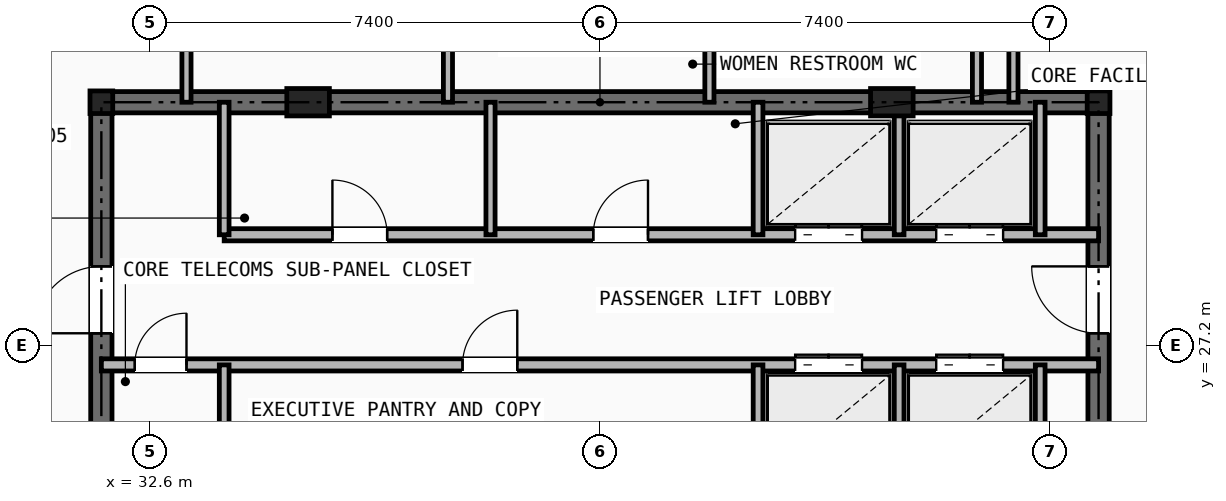
"""IFC4 building model, lengths in metres.
Left out: names, types, materials, properties, quantities, classifications, styles, units other than length and angle.
Written with IfcOpenShell. Run it as: python <this file> out.ifc"""

import sys

from ifc_helpers import new_model, si_unit, direction, frame, frame_2d, origin, origin_2d, place, context, subcontext, project, spatial, rectangle, i_section, extrude, element, fill, save


model = new_model("IFC4")
c1 = context("Model", 3, precision=1e-05, world=origin(), true_north=direction((0.0, 1.0)))
c2 = subcontext(c1, "Body", "Model", "MODEL_VIEW")
j1 = project(units=[si_unit("LENGTHUNIT", "METRE"), si_unit("PLANEANGLEUNIT", "RADIAN")], contexts=[c1])
p1 = place(None, origin())
s1 = spatial("IfcSite", under=j1, at=p1, CompositionType="ELEMENT")
p2 = place(p1, origin())
s2 = spatial("IfcBuilding", under=s1, at=p2, CompositionType="ELEMENT")
p3 = place(p2, frame((0.0, 0.0, 243.4)))
s3 = spatial("IfcBuildingStorey", under=s2, at=p3, CompositionType="ELEMENT", Elevation=243.4)
for number, where, z_axis, x_axis in (
    (1, (31.8, 31.2, 0.0), (0.0, 0.0, 1.0), (1.0, 0.0, 0.0)),
    (2, (48.2, 31.2, 0.0), (0.0, 0.0, 1.0), (1.0, 0.0, 0.0)),
):
    element("IfcColumn", number, at=place(p3, frame(where, z_axis=z_axis, x_axis=x_axis)), inside=s3, PredefinedType="COLUMN", context=c2, shape_type="SweptSolid", body=[
        extrude(i_section(OverallWidth=0.374, OverallDepth=0.372, WebThickness=0.016, FlangeThickness=0.026, at=origin_2d()), origin(), (0.0, 0.0, 1.0), 3.5),
    ])
for number, where, z_axis, x_axis in (
    (3, (35.2, 31.2, 0.0), (0.0, 0.0, 1.0), (1.0, 0.0, 0.0)),
    (4, (44.8, 31.2, 0.0), (0.0, 0.0, 1.0), (1.0, 0.0, 0.0)),
):
    element("IfcColumn", number, at=place(p3, frame(where, z_axis=z_axis, x_axis=x_axis)), inside=s3, PredefinedType="PILASTER", context=c2, shape_type="SweptSolid", body=[
        extrude(rectangle(XDim=0.7, YDim=0.45, at=origin_2d()), origin(), (0.0, 0.0, 1.0), 3.5),
    ])
p4 = place(p3, frame((31.8, 31.2, 0.0), z_axis=(0.0, 0.0, 1.0), x_axis=(1.0, 0.0, 0.0)))
e5 = element("IfcWall", 5, at=p4, inside=s3, PredefinedType="SHEAR", context=c2, shape_type="SweptSolid", body=[
    extrude(rectangle(XDim=16.4, YDim=0.35, at=frame_2d((8.2, 0.0))), origin(), (0.0, 0.0, 1.0), 3.25),
])
p5 = place(p3, frame((31.8, 16.4, 0.0), z_axis=(0.0, 0.0, 1.0), x_axis=(0.0, 1.0, 0.0)))
e6 = element("IfcWall", 6, at=p5, inside=s3, PredefinedType="SHEAR", context=c2, shape_type="SweptSolid", body=[
    extrude(rectangle(XDim=14.8, YDim=0.35, at=frame_2d((7.4, 0.0))), origin(), (0.0, 0.0, 1.0), 3.25),
])
p6 = place(p5, frame((11.0, 0.0, 0.0)))
e7 = element("IfcOpeningElement", 7, at=p6, cuts=e6, PredefinedType="OPENING", context=c2, shape_type="SweptSolid", body=[
    extrude(rectangle(XDim=1.1, YDim=2.15, at=frame_2d((0.55, 1.075))), frame((0.0, 0.185, 0.0), z_axis=(0.0, -1.0, 0.0), x_axis=(1.0, 0.0, 0.0)), (0.0, 0.0, 1.0), 0.37),
])
p7 = place(p3, frame((48.2, 16.4, 0.0), z_axis=(0.0, 0.0, 1.0), x_axis=(0.0, 1.0, 0.0)))
e8 = element("IfcWall", 8, at=p7, inside=s3, PredefinedType="SHEAR", context=c2, shape_type="SweptSolid", body=[
    extrude(rectangle(XDim=14.8, YDim=0.35, at=frame_2d((7.4, 0.0))), origin(), (0.0, 0.0, 1.0), 3.25),
])
p8 = place(p7, frame((11.0, 0.0, 0.0)))
e9 = element("IfcOpeningElement", 9, at=p8, cuts=e8, PredefinedType="OPENING", context=c2, shape_type="SweptSolid", body=[
    extrude(rectangle(XDim=1.1, YDim=2.15, at=frame_2d((0.55, 1.075))), frame((0.0, 0.185, 0.0), z_axis=(0.0, -1.0, 0.0), x_axis=(1.0, 0.0, 0.0)), (0.0, 0.0, 1.0), 0.37),
])
p9 = place(p3, frame((33.82, 29.02, 0.0), z_axis=(0.0, 0.0, 1.0), x_axis=(1.0, 0.0, 0.0)))
e10 = element("IfcWall", 10, at=p9, inside=s3, PredefinedType="SOLIDWALL", context=c2, shape_type="SweptSolid", body=[
    extrude(rectangle(XDim=14.38, YDim=0.2, at=frame_2d((7.19, 0.0))), origin(), (0.0, 0.0, 1.0), 2.705),
])
p10 = place(p9, frame((1.78, 0.0, 0.0)))
e11 = element("IfcOpeningElement", 11, at=p10, cuts=e10, PredefinedType="OPENING", context=c2, shape_type="SweptSolid", body=[
    extrude(rectangle(XDim=0.9, YDim=2.1, at=frame_2d((0.45, 1.05))), frame((0.0, 0.11, 0.0), z_axis=(0.0, -1.0, 0.0), x_axis=(1.0, 0.0, 0.0)), (0.0, 0.0, 1.0), 0.22),
])
p11 = place(p9, frame((6.07, 0.0, 0.0)))
e12 = element("IfcOpeningElement", 12, at=p11, cuts=e10, PredefinedType="OPENING", context=c2, shape_type="SweptSolid", body=[
    extrude(rectangle(XDim=0.9, YDim=2.1, at=frame_2d((0.45, 1.05))), frame((0.0, 0.11, 0.0), z_axis=(0.0, -1.0, 0.0), x_axis=(1.0, 0.0, 0.0)), (0.0, 0.0, 1.0), 0.22),
])
p12 = place(p9, frame((9.39, 0.0, 0.0)))
e13 = element("IfcOpeningElement", 13, at=p12, cuts=e10, PredefinedType="OPENING", context=c2, shape_type="SweptSolid", body=[
    extrude(rectangle(XDim=1.1, YDim=2.15, at=frame_2d((0.55, 1.075))), frame((0.0, 0.11, 0.0), z_axis=(0.0, -1.0, 0.0), x_axis=(1.0, 0.0, 0.0)), (0.0, 0.0, 1.0), 0.22),
])
p13 = place(p9, frame((11.71, 0.0, 0.0)))
e14 = element("IfcOpeningElement", 14, at=p13, cuts=e10, PredefinedType="OPENING", context=c2, shape_type="SweptSolid", body=[
    extrude(rectangle(XDim=1.1, YDim=2.15, at=frame_2d((0.55, 1.075))), frame((0.0, 0.11, 0.0), z_axis=(0.0, -1.0, 0.0), x_axis=(1.0, 0.0, 0.0)), (0.0, 0.0, 1.0), 0.22),
])
p14 = place(p3, frame((31.8, 26.88, 0.0), z_axis=(0.0, 0.0, 1.0), x_axis=(1.0, 0.0, 0.0)))
e15 = element("IfcWall", 15, at=p14, inside=s3, PredefinedType="SOLIDWALL", context=c2, shape_type="SweptSolid", body=[
    extrude(rectangle(XDim=16.4, YDim=0.2, at=frame_2d((8.2, 0.0))), origin(), (0.0, 0.0, 1.0), 2.705),
])
p15 = place(p14, frame((0.55, 0.0, 0.0)))
e16 = element("IfcOpeningElement", 16, at=p15, cuts=e15, PredefinedType="OPENING", context=c2, shape_type="SweptSolid", body=[
    extrude(rectangle(XDim=0.85, YDim=2.05, at=frame_2d((0.425, 1.025))), frame((0.0, 0.11, 0.0), z_axis=(0.0, -1.0, 0.0), x_axis=(1.0, 0.0, 0.0)), (0.0, 0.0, 1.0), 0.22),
])
p16 = place(p14, frame((5.94, 0.0, 0.0)))
e17 = element("IfcOpeningElement", 17, at=p16, cuts=e15, PredefinedType="OPENING", context=c2, shape_type="SweptSolid", body=[
    extrude(rectangle(XDim=0.9, YDim=2.1, at=frame_2d((0.45, 1.05))), frame((0.0, 0.11, 0.0), z_axis=(0.0, -1.0, 0.0), x_axis=(1.0, 0.0, 0.0)), (0.0, 0.0, 1.0), 0.22),
])
p17 = place(p14, frame((11.41, 0.0, 0.0)))
e18 = element("IfcOpeningElement", 18, at=p17, cuts=e15, PredefinedType="OPENING", context=c2, shape_type="SweptSolid", body=[
    extrude(rectangle(XDim=1.1, YDim=2.15, at=frame_2d((0.55, 1.075))), frame((0.0, 0.11, 0.0), z_axis=(0.0, -1.0, 0.0), x_axis=(1.0, 0.0, 0.0)), (0.0, 0.0, 1.0), 0.22),
])
p18 = place(p14, frame((13.73, 0.0, 0.0)))
e19 = element("IfcOpeningElement", 19, at=p18, cuts=e15, PredefinedType="OPENING", context=c2, shape_type="SweptSolid", body=[
    extrude(rectangle(XDim=1.1, YDim=2.15, at=frame_2d((0.55, 1.075))), frame((0.0, 0.11, 0.0), z_axis=(0.0, -1.0, 0.0), x_axis=(1.0, 0.0, 0.0)), (0.0, 0.0, 1.0), 0.22),
])
p19 = place(p3, frame((33.82, 29.02, 0.0), z_axis=(0.0, 0.0, 1.0), x_axis=(0.0, 1.0, 0.0)))
e20 = element("IfcWall", 20, at=p19, inside=s3, PredefinedType="SOLIDWALL", context=c2, shape_type="SweptSolid", body=[
    extrude(rectangle(XDim=2.18, YDim=0.16, at=frame_2d((1.09, 0.0))), origin(), (0.0, 0.0, 1.0), 2.705),
])
p20 = place(p3, frame((33.82, 24.8, 0.0), z_axis=(0.0, 0.0, 1.0), x_axis=(0.0, 1.0, 0.0)))
e21 = element("IfcWall", 21, at=p20, inside=s3, PredefinedType="SOLIDWALL", context=c2, shape_type="SweptSolid", body=[
    extrude(rectangle(XDim=2.08, YDim=0.16, at=frame_2d((1.04, 0.0))), origin(), (0.0, 0.0, 1.0), 3.25),
])
p21 = place(p3, frame((38.2, 29.02, 0.0), z_axis=(0.0, 0.0, 1.0), x_axis=(0.0, 1.0, 0.0)))
e22 = element("IfcWall", 22, at=p21, inside=s3, PredefinedType="PARTITIONING", context=c2, shape_type="SweptSolid", body=[
    extrude(rectangle(XDim=2.18, YDim=0.15, at=frame_2d((1.09, 0.0))), origin(), (0.0, 0.0, 1.0), 2.705),
])
for number, where, z_axis, x_axis in (
    (23, (42.6, 29.02, 0.0), (0.0, 0.0, 1.0), (0.0, 1.0, 0.0)),
    (24, (44.92, 29.02, 0.0), (0.0, 0.0, 1.0), (0.0, 1.0, 0.0)),
    (25, (47.24, 29.02, 0.0), (0.0, 0.0, 1.0), (0.0, 1.0, 0.0)),
):
    element("IfcWall", number, at=place(p3, frame(where, z_axis=z_axis, x_axis=x_axis)), inside=s3, PredefinedType="SOLIDWALL", context=c2, shape_type="SweptSolid", body=[
        extrude(rectangle(XDim=2.18, YDim=0.16, at=frame_2d((1.09, 0.0))), origin(), (0.0, 0.0, 1.0), 2.705),
    ])
for number, where, z_axis, x_axis in (
    (26, (42.6, 24.8, 0.0), (0.0, 0.0, 1.0), (0.0, 1.0, 0.0)),
    (27, (44.92, 24.8, 0.0), (0.0, 0.0, 1.0), (0.0, 1.0, 0.0)),
    (28, (47.24, 24.8, 0.0), (0.0, 0.0, 1.0), (0.0, 1.0, 0.0)),
):
    element("IfcWall", number, at=place(p3, frame(where, z_axis=z_axis, x_axis=x_axis)), inside=s3, PredefinedType="SOLIDWALL", context=c2, shape_type="SweptSolid", body=[
        extrude(rectangle(XDim=2.08, YDim=0.16, at=frame_2d((1.04, 0.0))), origin(), (0.0, 0.0, 1.0), 3.25),
    ])
for number, where, z_axis, x_axis in (
    (29, (33.2, 31.2, 0.0), (0.0, 0.0, 1.0), (0.0, 1.0, 0.0)),
    (30, (46.2, 31.2, 0.0), (0.0, 0.0, 1.0), (0.0, 1.0, 0.0)),
    (31, (37.5, 31.2, 0.0), (0.0, 0.0, 1.0), (0.0, 1.0, 0.0)),
    (32, (41.8, 31.2, 0.0), (0.0, 0.0, 1.0), (0.0, 1.0, 0.0)),
):
    element("IfcWall", number, at=place(p3, frame(where, z_axis=z_axis, x_axis=x_axis)), inside=s3, PredefinedType="PARTITIONING", context=c2, shape_type="SweptSolid", body=[
        extrude(rectangle(XDim=2.6, YDim=0.15, at=frame_2d((1.3, 0.0))), origin(), (0.0, 0.0, 1.0), 2.705),
    ])
p22 = place(p3, frame((46.8, 31.2, 0.0), z_axis=(0.0, 0.0, 1.0), x_axis=(0.0, 1.0, 0.0)))
e33 = element("IfcWall", 33, at=p22, inside=s3, PredefinedType="PARTITIONING", context=c2, shape_type="SweptSolid", body=[
    extrude(rectangle(XDim=4.5, YDim=0.15, at=frame_2d((2.25, 0.0))), origin(), (0.0, 0.0, 1.0), 2.705),
])
p23 = place(p15, origin())
e34 = element("IfcDoor", 34, at=p23, inside=s3, OperationType="SINGLE_SWING_RIGHT", PredefinedType="DOOR", context=c2, shape_type="SweptSolid", body=[
    extrude(rectangle(XDim=0.85, YDim=2.05, at=frame_2d((0.425, 1.025))), frame((0.0, 0.025, 0.0), z_axis=(0.0, -1.0, 0.0), x_axis=(1.0, 0.0, 0.0)), (0.0, 0.0, 1.0), 0.05),
])
fill(e16, e34)
p24 = place(p6, origin())
e35 = element("IfcDoor", 35, at=p24, inside=s3, OperationType="SINGLE_SWING_LEFT", PredefinedType="DOOR", context=c2, shape_type="SweptSolid", body=[
    extrude(rectangle(XDim=1.1, YDim=2.15, at=frame_2d((0.55, 1.075))), frame((0.0, 0.025, 0.0), z_axis=(0.0, -1.0, 0.0), x_axis=(1.0, 0.0, 0.0)), (0.0, 0.0, 1.0), 0.05),
])
fill(e7, e35)
p25 = place(p8, origin())
e36 = element("IfcDoor", 36, at=p25, inside=s3, OperationType="SINGLE_SWING_RIGHT", PredefinedType="DOOR", context=c2, shape_type="SweptSolid", body=[
    extrude(rectangle(XDim=1.1, YDim=2.15, at=frame_2d((0.55, 1.075))), frame((0.0, 0.025, 0.0), z_axis=(0.0, -1.0, 0.0), x_axis=(1.0, 0.0, 0.0)), (0.0, 0.0, 1.0), 0.05),
])
fill(e9, e36)
p26 = place(p10, origin())
e37 = element("IfcDoor", 37, at=p26, inside=s3, OperationType="SINGLE_SWING_LEFT", PredefinedType="DOOR", context=c2, shape_type="SweptSolid", body=[
    extrude(rectangle(XDim=0.9, YDim=2.1, at=frame_2d((0.45, 1.05))), frame((0.0, 0.025, 0.0), z_axis=(0.0, -1.0, 0.0), x_axis=(1.0, 0.0, 0.0)), (0.0, 0.0, 1.0), 0.05),
])
fill(e11, e37)
p27 = place(p11, origin())
e38 = element("IfcDoor", 38, at=p27, inside=s3, OperationType="SINGLE_SWING_RIGHT", PredefinedType="DOOR", context=c2, shape_type="SweptSolid", body=[
    extrude(rectangle(XDim=0.9, YDim=2.1, at=frame_2d((0.45, 1.05))), frame((0.0, 0.025, 0.0), z_axis=(0.0, -1.0, 0.0), x_axis=(1.0, 0.0, 0.0)), (0.0, 0.0, 1.0), 0.05),
])
fill(e12, e38)
p28 = place(p16, origin())
e39 = element("IfcDoor", 39, at=p28, inside=s3, OperationType="SINGLE_SWING_RIGHT", PredefinedType="DOOR", context=c2, shape_type="SweptSolid", body=[
    extrude(rectangle(XDim=0.9, YDim=2.1, at=frame_2d((0.45, 1.05))), frame((0.0, 0.025, 0.0), z_axis=(0.0, -1.0, 0.0), x_axis=(1.0, 0.0, 0.0)), (0.0, 0.0, 1.0), 0.05),
])
fill(e17, e39)
p29 = place(p12, origin())
e40 = element("IfcDoor", 40, at=p29, inside=s3, OperationType="DOUBLE_DOOR_SLIDING", PredefinedType="DOOR", context=c2, shape_type="SweptSolid", body=[
    extrude(rectangle(XDim=1.1, YDim=2.15, at=frame_2d((0.55, 1.075))), frame((0.0, 0.025, 0.0), z_axis=(0.0, -1.0, 0.0), x_axis=(1.0, 0.0, 0.0)), (0.0, 0.0, 1.0), 0.05),
])
fill(e13, e40)
p30 = place(p13, origin())
e41 = element("IfcDoor", 41, at=p30, inside=s3, OperationType="DOUBLE_DOOR_SLIDING", PredefinedType="DOOR", context=c2, shape_type="SweptSolid", body=[
    extrude(rectangle(XDim=1.1, YDim=2.15, at=frame_2d((0.55, 1.075))), frame((0.0, 0.025, 0.0), z_axis=(0.0, -1.0, 0.0), x_axis=(1.0, 0.0, 0.0)), (0.0, 0.0, 1.0), 0.05),
])
fill(e14, e41)
p31 = place(p17, origin())
e42 = element("IfcDoor", 42, at=p31, inside=s3, OperationType="DOUBLE_DOOR_SLIDING", PredefinedType="DOOR", context=c2, shape_type="SweptSolid", body=[
    extrude(rectangle(XDim=1.1, YDim=2.15, at=frame_2d((0.55, 1.075))), frame((0.0, 0.025, 0.0), z_axis=(0.0, -1.0, 0.0), x_axis=(1.0, 0.0, 0.0)), (0.0, 0.0, 1.0), 0.05),
])
fill(e18, e42)
p32 = place(p18, origin())
e43 = element("IfcDoor", 43, at=p32, inside=s3, OperationType="DOUBLE_DOOR_SLIDING", PredefinedType="DOOR", context=c2, shape_type="SweptSolid", body=[
    extrude(rectangle(XDim=1.1, YDim=2.15, at=frame_2d((0.55, 1.075))), frame((0.0, 0.025, 0.0), z_axis=(0.0, -1.0, 0.0), x_axis=(1.0, 0.0, 0.0)), (0.0, 0.0, 1.0), 0.05),
])
fill(e19, e43)
save(model, sys.argv[1])
